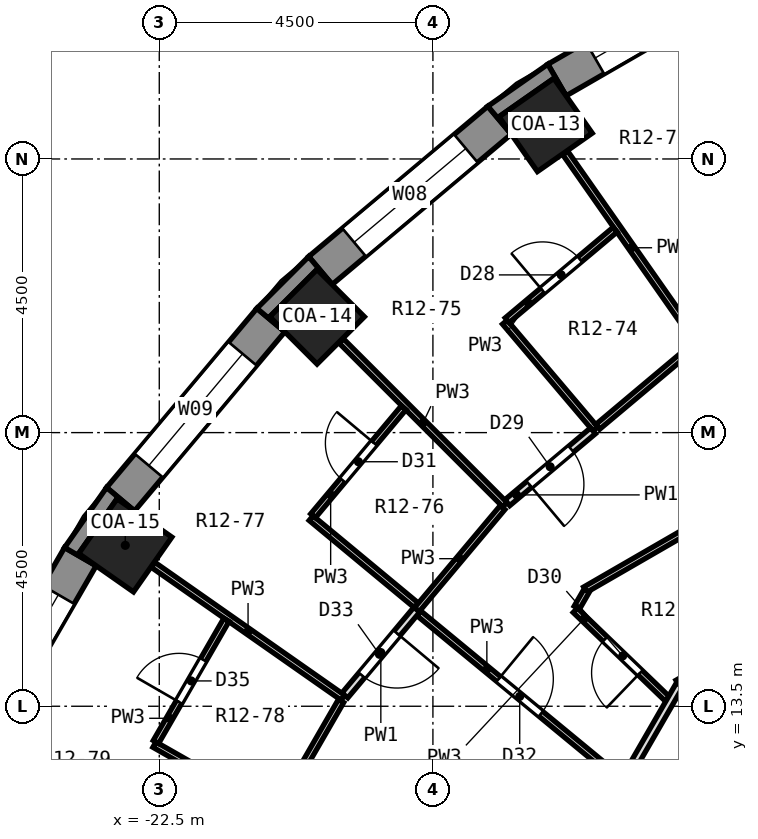
"""IFC4 building model, lengths in metres.
Left out: names, types, materials, properties, quantities, classifications, styles, units other than length and angle.
Written with IfcOpenShell. Run it as: python <this file> out.ifc"""

import sys

from ifc_helpers import new_model, si_unit, direction, frame, frame_2d, origin, origin_2d, place, context, subcontext, project, spatial, polyline, rectangle, outline, extrude, element, fill, save


model = new_model("IFC4")
c1 = context("Model", 3, precision=1e-05, world=origin(), true_north=direction((0.0, 1.0)))
c2 = subcontext(c1, "Body", "Model", "MODEL_VIEW")
j1 = project(units=[si_unit("LENGTHUNIT", "METRE"), si_unit("PLANEANGLEUNIT", "RADIAN")], contexts=[c1])
p1 = place(None, origin())
s1 = spatial("IfcSite", under=j1, at=p1, CompositionType="ELEMENT")
p2 = place(p1, origin())
s2 = spatial("IfcBuilding", under=s1, at=p2, CompositionType="ELEMENT")
p3 = place(p2, frame((0.0, 0.0, 56.0)))
s3 = spatial("IfcBuildingStorey", under=s2, at=p3, CompositionType="ELEMENT", Elevation=56.0)
for number, where, z_axis, x_axis in (
    (1, (-16.146, 23.059, 0.0), (0.0, 0.0, 1.0), (-0.574, 0.819, 0.0)),
    (2, (-19.905, 19.905, 0.0), (0.0, 0.0, 1.0), (-0.707, 0.707, 0.0)),
    (3, (-23.059, 16.146, 0.0), (0.0, 0.0, 1.0), (-0.819, 0.574, 0.0)),
):
    element("IfcColumn", number, at=place(p3, frame(where, z_axis=z_axis, x_axis=x_axis)), inside=s3, PredefinedType="COLUMN", context=c2, shape_type="SweptSolid", body=[
        extrude(rectangle(XDim=1.1, YDim=1.1, at=origin_2d()), origin(), (0.0, 0.0, 1.0), 3.3),
    ])
p4 = place(p3, frame((-12.63, 25.721, 0.0), z_axis=(0.0, 0.0, 1.0), x_axis=(-0.86603124159, -0.499989888488, 0.0)))
e4 = element("IfcWall", 4, at=p4, inside=s3, PredefinedType="SOLIDWALL", context=c2, shape_type="SweptSolid", body=[
    extrude(rectangle(XDim=3.846, YDim=0.6, at=frame_2d((1.923, 0.0))), origin(), (0.0, 0.0, 1.0), 2.75),
])
p5 = place(p4, frame((0.723, 0.0, 0.9)))
e5 = element("IfcOpeningElement", 5, at=p5, cuts=e4, PredefinedType="OPENING", context=c2, shape_type="SweptSolid", body=[
    extrude(rectangle(XDim=2.4, YDim=1.8, at=frame_2d((1.2, 0.9))), frame((0.0, 0.312, 0.0), z_axis=(0.0, -1.0, 0.0), x_axis=(1.0, 0.0, 0.0)), (0.0, 0.0, 1.0), 0.624),
])
p6 = place(p3, frame((-16.904, 23.137, 0.0), z_axis=(0.0, 0.0, 1.0), x_axis=(-0.766026164483, -0.642809392687, 0.0)))
e6 = element("IfcWall", 6, at=p6, inside=s3, PredefinedType="SOLIDWALL", context=c2, shape_type="SweptSolid", body=[
    extrude(rectangle(XDim=3.846, YDim=0.6, at=frame_2d((1.923, 0.0))), origin(), (0.0, 0.0, 1.0), 2.75),
])
p7 = place(p6, frame((0.723, 0.0, 0.9)))
e7 = element("IfcOpeningElement", 7, at=p7, cuts=e6, PredefinedType="OPENING", context=c2, shape_type="SweptSolid", body=[
    extrude(rectangle(XDim=2.4, YDim=1.8, at=frame_2d((1.2, 0.9))), frame((0.0, 0.312, 0.0), z_axis=(0.0, -1.0, 0.0), x_axis=(1.0, 0.0, 0.0)), (0.0, 0.0, 1.0), 0.624),
])
p8 = place(p3, frame((-20.665, 19.85, 0.0), z_axis=(0.0, 0.0, 1.0), x_axis=(-0.642809392687, -0.766026164483, 0.0)))
e8 = element("IfcWall", 8, at=p8, inside=s3, PredefinedType="SOLIDWALL", context=c2, shape_type="SweptSolid", body=[
    extrude(rectangle(XDim=3.846, YDim=0.6, at=frame_2d((1.923, 0.0))), origin(), (0.0, 0.0, 1.0), 2.75),
])
p9 = place(p8, frame((0.723, 0.0, 0.9)))
e9 = element("IfcOpeningElement", 9, at=p9, cuts=e8, PredefinedType="OPENING", context=c2, shape_type="SweptSolid", body=[
    extrude(rectangle(XDim=2.4, YDim=1.8, at=frame_2d((1.2, 0.9))), frame((0.0, 0.312, 0.0), z_axis=(0.0, -1.0, 0.0), x_axis=(1.0, 0.0, 0.0)), (0.0, 0.0, 1.0), 0.624),
])
p10 = place(p3, frame((-23.798, 15.96, 0.0), z_axis=(0.0, 0.0, 1.0), x_axis=(-0.499989888488, -0.86603124159, 0.0)))
e10 = element("IfcWall", 10, at=p10, inside=s3, PredefinedType="SOLIDWALL", context=c2, shape_type="SweptSolid", body=[
    extrude(rectangle(XDim=3.846, YDim=0.6, at=frame_2d((1.923, 0.0))), origin(), (0.0, 0.0, 1.0), 2.75),
])
p11 = place(p10, frame((0.723, 0.0, 0.9)))
e11 = element("IfcOpeningElement", 11, at=p11, cuts=e10, PredefinedType="OPENING", context=c2, shape_type="SweptSolid", body=[
    extrude(rectangle(XDim=2.4, YDim=1.8, at=frame_2d((1.2, 0.9))), frame((0.0, 0.312, 0.0), z_axis=(0.0, -1.0, 0.0), x_axis=(1.0, 0.0, 0.0)), (0.0, 0.0, 1.0), 0.624),
])
p12 = place(p3, origin())
e12 = element("IfcWall", 12, at=p12, inside=s3, PredefinedType="SOLIDWALL", context=c2, shape_type="SweptSolid", body=[
    extrude(outline(polyline([(-16.11, 24.058), (-17.097, 23.367), (-16.711, 22.907), (-16.912, 23.194), (-16.011, 23.825), (-15.81, 23.538), (-16.11, 24.058)])), origin(), (0.0, 0.0, 1.0), 2.75),
])
p13 = place(p3, origin())
e13 = element("IfcWall", 13, at=p13, inside=s3, PredefinedType="SOLIDWALL", context=c2, shape_type="SweptSolid", body=[
    extrude(outline(polyline([(-20.895, 20.043), (-20.435, 19.657), (-20.683, 19.905), (-19.905, 20.683), (-19.657, 20.435), (-20.043, 20.895), (-20.895, 20.043)])), origin(), (0.0, 0.0, 1.0), 2.75),
])
p14 = place(p3, origin())
e14 = element("IfcWall", 14, at=p14, inside=s3, PredefinedType="SOLIDWALL", context=c2, shape_type="SweptSolid", body=[
    extrude(outline(polyline([(-23.367, 17.097), (-24.058, 16.11), (-23.538, 15.81), (-23.825, 16.011), (-23.194, 16.912), (-22.907, 16.711), (-23.367, 17.097)])), origin(), (0.0, 0.0, 1.0), 2.75),
])
p15 = place(p3, frame((-15.825, 22.601, 0.0), z_axis=(0.0, 0.0, 1.0), x_axis=(0.573574167811, -0.819153632733, 0.0)))
e15 = element("IfcWall", 15, at=p15, inside=s3, PredefinedType="PARTITIONING", context=c2, shape_type="SweptSolid", body=[
    extrude(rectangle(XDim=3.81, YDim=0.1, at=frame_2d((1.905, 0.0))), origin(), (0.0, 0.0, 1.0), 2.75),
])
p16 = place(p3, frame((-16.817, 19.816, 0.0), z_axis=(0.0, 0.0, 1.0), x_axis=(0.646883930741, -0.762588473653, 0.0)))
e16 = element("IfcWall", 16, at=p16, inside=s3, PredefinedType="PARTITIONING", context=c2, shape_type="SweptSolid", body=[
    extrude(rectangle(XDim=2.3, YDim=0.1, at=frame_2d((1.15, 0.0))), origin(), (0.0, 0.0, 1.0), 2.75),
])
p17 = place(p3, frame((-19.509, 19.509, 0.0), z_axis=(0.0, 0.0, 1.0), x_axis=(0.707106781187, -0.707106781187, 0.0)))
e17 = element("IfcWall", 17, at=p17, inside=s3, PredefinedType="PARTITIONING", context=c2, shape_type="SweptSolid", body=[
    extrude(rectangle(XDim=3.81, YDim=0.1, at=frame_2d((1.905, 0.0))), origin(), (0.0, 0.0, 1.0), 2.75),
])
p18 = place(p3, frame((-15.658, 15.078, 0.0), z_axis=(0.0, 0.0, 1.0), x_axis=(0.720406258369, -0.693552321676, 0.0)))
e18 = element("IfcWall", 18, at=p18, inside=s3, PredefinedType="PARTITIONING", context=c2, shape_type="SweptSolid", body=[
    extrude(rectangle(XDim=2.1, YDim=0.1, at=frame_2d((1.05, 0.0))), origin(), (0.0, 0.0, 1.0), 2.75),
])
p19 = place(p18, frame((0.681, 0.0, 0.0)))
e19 = element("IfcOpeningElement", 19, at=p19, cuts=e18, PredefinedType="OPENING", context=c2, shape_type="SweptSolid", body=[
    extrude(rectangle(XDim=0.8, YDim=2.1, at=frame_2d((0.4, 1.05))), frame((0.0, 0.062, 0.0), z_axis=(0.0, -1.0, 0.0), x_axis=(1.0, 0.0, 0.0)), (0.0, 0.0, 1.0), 0.124),
])
p20 = place(p3, frame((-20.003, 16.594, 0.0), z_axis=(0.0, 0.0, 1.0), x_axis=(0.769713734446, -0.638389197125, 0.0)))
e20 = element("IfcWall", 20, at=p20, inside=s3, PredefinedType="PARTITIONING", context=c2, shape_type="SweptSolid", body=[
    extrude(rectangle(XDim=2.25, YDim=0.1, at=frame_2d((1.125, 0.0))), origin(), (0.0, 0.0, 1.0), 2.75),
])
p21 = place(p3, frame((-18.232, 15.029, 0.0), z_axis=(0.0, 0.0, 1.0), x_axis=(0.771607312324, -0.636099171174, 0.0)))
e21 = element("IfcWall", 21, at=p21, inside=s3, PredefinedType="PARTITIONING", context=c2, shape_type="SweptSolid", body=[
    extrude(rectangle(XDim=4.301, YDim=0.1, at=frame_2d((2.15, 0.0))), origin(), (0.0, 0.0, 1.0), 2.75),
])
p22 = place(p21, frame((1.7, 0.0, 0.0)))
e22 = element("IfcOpeningElement", 22, at=p22, cuts=e21, PredefinedType="OPENING", context=c2, shape_type="SweptSolid", body=[
    extrude(rectangle(XDim=0.9, YDim=2.1, at=frame_2d((0.45, 1.05))), frame((0.0, 0.062, 0.0), z_axis=(0.0, -1.0, 0.0), x_axis=(1.0, 0.0, 0.0)), (0.0, 0.0, 1.0), 0.124),
])
p23 = place(p3, frame((-22.601, 15.825, 0.0), z_axis=(0.0, 0.0, 1.0), x_axis=(0.819153632733, -0.573574167811, 0.0)))
e23 = element("IfcWall", 23, at=p23, inside=s3, PredefinedType="PARTITIONING", context=c2, shape_type="SweptSolid", body=[
    extrude(rectangle(XDim=3.81, YDim=0.1, at=frame_2d((1.905, 0.0))), origin(), (0.0, 0.0, 1.0), 2.75),
])
p24 = place(p3, frame((-22.58, 12.869, 0.0), z_axis=(0.0, 0.0, 1.0), x_axis=(0.868771789729, -0.495212658735, 0.0)))
e24 = element("IfcWall", 24, at=p24, inside=s3, PredefinedType="PARTITIONING", context=c2, shape_type="SweptSolid", body=[
    extrude(rectangle(XDim=2.3, YDim=0.1, at=frame_2d((1.15, 0.0))), origin(), (0.0, 0.0, 1.0), 2.75),
])
p25 = place(p3, frame((-13.971, 13.873, 0.0), z_axis=(0.0, 0.0, 1.0), x_axis=(0.866024825845, 0.50000100102, 0.0)))
e25 = element("IfcWall", 25, at=p25, inside=s3, PredefinedType="PARTITIONING", context=c2, shape_type="SweptSolid", body=[
    extrude(rectangle(XDim=10.192, YDim=0.125, at=frame_2d((5.096, 0.0))), origin(), (0.0, 0.0, 1.0), 2.75),
])
p26 = place(p3, frame((-15.496, 15.417, 0.0), z_axis=(0.0, 0.0, 1.0), x_axis=(0.865919547832, 0.500183303083, 0.0)))
e26 = element("IfcWall", 26, at=p26, inside=s3, PredefinedType="PARTITIONING", context=c2, shape_type="SweptSolid", body=[
    extrude(rectangle(XDim=1.941, YDim=0.1, at=frame_2d((0.971, 0.0))), origin(), (0.0, 0.0, 1.0), 2.75),
])
p27 = place(p3, frame((-15.291, 18.094, 0.0), z_axis=(0.0, 0.0, 1.0), x_axis=(0.765911671875, 0.642945807114, 0.0)))
e27 = element("IfcWall", 27, at=p27, inside=s3, PredefinedType="PARTITIONING", context=c2, shape_type="SweptSolid", body=[
    extrude(rectangle(XDim=2.093, YDim=0.1, at=frame_2d((1.046, 0.0))), origin(), (0.0, 0.0, 1.0), 2.75),
])
p28 = place(p3, frame((-16.777, 16.847, 0.0), z_axis=(0.0, 0.0, 1.0), x_axis=(0.766052425686, 0.642778096314, 0.0)))
e28 = element("IfcWall", 28, at=p28, inside=s3, PredefinedType="PARTITIONING", context=c2, shape_type="SweptSolid", body=[
    extrude(rectangle(XDim=1.84, YDim=0.125, at=frame_2d((0.92, 0.0))), origin(), (0.0, 0.0, 1.0), 2.75),
])
p29 = place(p28, frame((0.47, 0.0, 0.0)))
e29 = element("IfcOpeningElement", 29, at=p29, cuts=e28, PredefinedType="OPENING", context=c2, shape_type="SweptSolid", body=[
    extrude(rectangle(XDim=0.9, YDim=2.1, at=frame_2d((0.45, 1.05))), frame((0.0, 0.074, 0.0), z_axis=(0.0, -1.0, 0.0), x_axis=(1.0, 0.0, 0.0)), (0.0, 0.0, 1.0), 0.149),
])
p30 = place(p3, frame((-16.779, 19.848, 0.0), z_axis=(0.0, 0.0, 1.0), x_axis=(0.766051078848, 0.642779701449, 0.0)))
e30 = element("IfcWall", 30, at=p30, inside=s3, PredefinedType="PARTITIONING", context=c2, shape_type="SweptSolid", body=[
    extrude(rectangle(XDim=2.319, YDim=0.1, at=frame_2d((1.16, 0.0))), origin(), (0.0, 0.0, 1.0), 2.75),
])
p31 = place(p30, frame((0.76, 0.0, 0.0)))
e31 = element("IfcOpeningElement", 31, at=p31, cuts=e30, PredefinedType="OPENING", context=c2, shape_type="SweptSolid", body=[
    extrude(rectangle(XDim=0.8, YDim=2.1, at=frame_2d((0.4, 1.05))), frame((0.0, 0.062, 0.0), z_axis=(0.0, -1.0, 0.0), x_axis=(1.0, 0.0, 0.0)), (0.0, 0.0, 1.0), 0.124),
])
p32 = place(p3, frame((-18.265, 15.087, 0.0), z_axis=(0.0, 0.0, 1.0), x_axis=(0.643038029584, 0.765834246106, 0.0)))
e32 = element("IfcWall", 32, at=p32, inside=s3, PredefinedType="PARTITIONING", context=c2, shape_type="SweptSolid", body=[
    extrude(rectangle(XDim=2.193, YDim=0.1, at=frame_2d((1.096, 0.0))), origin(), (0.0, 0.0, 1.0), 2.75),
])
p33 = place(p3, frame((-19.448, 13.678, 0.0), z_axis=(0.0, 0.0, 1.0), x_axis=(0.642778096314, 0.766052425686, 0.0)))
e33 = element("IfcWall", 33, at=p33, inside=s3, PredefinedType="PARTITIONING", context=c2, shape_type="SweptSolid", body=[
    extrude(rectangle(XDim=1.84, YDim=0.125, at=frame_2d((0.92, 0.0))), origin(), (0.0, 0.0, 1.0), 2.75),
])
p34 = place(p33, frame((0.433, 0.0, 0.0)))
e34 = element("IfcOpeningElement", 34, at=p34, cuts=e33, PredefinedType="OPENING", context=c2, shape_type="SweptSolid", body=[
    extrude(rectangle(XDim=0.9, YDim=2.1, at=frame_2d((0.45, 1.05))), frame((0.0, 0.074, 0.0), z_axis=(0.0, -1.0, 0.0), x_axis=(1.0, 0.0, 0.0)), (0.0, 0.0, 1.0), 0.149),
])
p35 = place(p3, frame((-19.971, 16.632, 0.0), z_axis=(0.0, 0.0, 1.0), x_axis=(0.642624220064, 0.766181513603, 0.0)))
e35 = element("IfcWall", 35, at=p35, inside=s3, PredefinedType="PARTITIONING", context=c2, shape_type="SweptSolid", body=[
    extrude(rectangle(XDim=2.32, YDim=0.1, at=frame_2d((1.16, 0.0))), origin(), (0.0, 0.0, 1.0), 2.75),
])
p36 = place(p35, frame((0.76, 0.0, 0.0)))
e36 = element("IfcOpeningElement", 36, at=p36, cuts=e35, PredefinedType="OPENING", context=c2, shape_type="SweptSolid", body=[
    extrude(rectangle(XDim=0.8, YDim=2.1, at=frame_2d((0.4, 1.05))), frame((0.0, 0.062, 0.0), z_axis=(0.0, -1.0, 0.0), x_axis=(1.0, 0.0, 0.0)), (0.0, 0.0, 1.0), 0.124),
])
p37 = place(p3, frame((-15.926, 10.416, 0.0), z_axis=(0.0, 0.0, 1.0), x_axis=(0.500020477838, 0.866013580576, 0.0)))
e37 = element("IfcWall", 37, at=p37, inside=s3, PredefinedType="PARTITIONING", context=c2, shape_type="SweptSolid", body=[
    extrude(rectangle(XDim=3.971, YDim=0.125, at=frame_2d((1.985, 0.0))), origin(), (0.0, 0.0, 1.0), 2.75),
])
p38 = place(p37, frame((0.53, 0.0, 0.0)))
e38 = element("IfcOpeningElement", 38, at=p38, cuts=e37, PredefinedType="OPENING", context=c2, shape_type="SweptSolid", body=[
    extrude(rectangle(XDim=1.0, YDim=2.1, at=frame_2d((0.5, 1.05))), frame((0.0, 0.074, 0.0), z_axis=(0.0, -1.0, 0.0), x_axis=(1.0, 0.0, 0.0)), (0.0, 0.0, 1.0), 0.149),
])
p39 = place(p3, frame((-20.557, 11.773, 0.0), z_axis=(0.0, 0.0, 1.0), x_axis=(0.499752749986, 0.866168106594, 0.0)))
e39 = element("IfcWall", 39, at=p39, inside=s3, PredefinedType="PARTITIONING", context=c2, shape_type="SweptSolid", body=[
    extrude(rectangle(XDim=2.093, YDim=0.1, at=frame_2d((1.046, 0.0))), origin(), (0.0, 0.0, 1.0), 2.75),
])
p40 = place(p3, frame((-22.555, 12.912, 0.0), z_axis=(0.0, 0.0, 1.0), x_axis=(0.499819678633, 0.866129487347, 0.0)))
e40 = element("IfcWall", 40, at=p40, inside=s3, PredefinedType="PARTITIONING", context=c2, shape_type="SweptSolid", body=[
    extrude(rectangle(XDim=2.319, YDim=0.1, at=frame_2d((1.159, 0.0))), origin(), (0.0, 0.0, 1.0), 2.75),
])
p41 = place(p40, frame((0.76, 0.0, 0.0)))
e41 = element("IfcOpeningElement", 41, at=p41, cuts=e40, PredefinedType="OPENING", context=c2, shape_type="SweptSolid", body=[
    extrude(rectangle(XDim=0.8, YDim=2.1, at=frame_2d((0.4, 1.05))), frame((0.0, 0.062, 0.0), z_axis=(0.0, -1.0, 0.0), x_axis=(1.0, 0.0, 0.0)), (0.0, 0.0, 1.0), 0.124),
])
p42 = place(p3, frame((-15.633, 15.121, 0.0), z_axis=(0.0, 0.0, 1.0), x_axis=(0.499375175205, 0.866385846139, 0.0)))
e42 = element("IfcWall", 42, at=p42, inside=s3, PredefinedType="PARTITIONING", context=c2, shape_type="SweptSolid", body=[
    extrude(rectangle(XDim=0.325, YDim=0.1, at=frame_2d((0.162, 0.0))), origin(), (0.0, 0.0, 1.0), 2.75),
])
p43 = place(p5, origin())
e43 = element("IfcWindow", 43, at=p43, inside=s3, PartitioningType="SINGLE_PANEL", PredefinedType="WINDOW", context=c2, shape_type="SweptSolid", body=[
    extrude(rectangle(XDim=2.4, YDim=1.8, at=frame_2d((1.2, 0.9))), frame((0.0, 0.18, 0.0), z_axis=(0.0, -1.0, 0.0), x_axis=(1.0, 0.0, 0.0)), (0.0, 0.0, 1.0), 0.06),
])
fill(e5, e43)
p44 = place(p7, origin())
e44 = element("IfcWindow", 44, at=p44, inside=s3, PartitioningType="SINGLE_PANEL", PredefinedType="WINDOW", context=c2, shape_type="SweptSolid", body=[
    extrude(rectangle(XDim=2.4, YDim=1.8, at=frame_2d((1.2, 0.9))), frame((0.0, 0.18, 0.0), z_axis=(0.0, -1.0, 0.0), x_axis=(1.0, 0.0, 0.0)), (0.0, 0.0, 1.0), 0.06),
])
fill(e7, e44)
p45 = place(p9, origin())
e45 = element("IfcWindow", 45, at=p45, inside=s3, PartitioningType="SINGLE_PANEL", PredefinedType="WINDOW", context=c2, shape_type="SweptSolid", body=[
    extrude(rectangle(XDim=2.4, YDim=1.8, at=frame_2d((1.2, 0.9))), frame((0.0, 0.18, 0.0), z_axis=(0.0, -1.0, 0.0), x_axis=(1.0, 0.0, 0.0)), (0.0, 0.0, 1.0), 0.06),
])
fill(e9, e45)
p46 = place(p11, origin())
e46 = element("IfcWindow", 46, at=p46, inside=s3, PartitioningType="SINGLE_PANEL", PredefinedType="WINDOW", context=c2, shape_type="SweptSolid", body=[
    extrude(rectangle(XDim=2.4, YDim=1.8, at=frame_2d((1.2, 0.9))), frame((0.0, 0.18, 0.0), z_axis=(0.0, -1.0, 0.0), x_axis=(1.0, 0.0, 0.0)), (0.0, 0.0, 1.0), 0.06),
])
fill(e11, e46)
p47 = place(p31, origin())
e47 = element("IfcDoor", 47, at=p47, inside=s3, OperationType="SINGLE_SWING_LEFT", PredefinedType="DOOR", context=c2, shape_type="SweptSolid", body=[
    extrude(rectangle(XDim=0.8, YDim=2.1, at=frame_2d((0.4, 1.05))), frame((0.0, 0.025, 0.0), z_axis=(0.0, -1.0, 0.0), x_axis=(1.0, 0.0, 0.0)), (0.0, 0.0, 1.0), 0.05),
])
fill(e31, e47)
p48 = place(p29, frame((0.9, 0.0, 0.0), z_axis=(0.0, 0.0, 1.0), x_axis=(-1.0, 0.0, 0.0)))
e48 = element("IfcDoor", 48, at=p48, inside=s3, OperationType="SINGLE_SWING_RIGHT", PredefinedType="DOOR", context=c2, shape_type="SweptSolid", body=[
    extrude(rectangle(XDim=0.9, YDim=2.1, at=frame_2d((0.45, 1.05))), frame((0.0, 0.025, 0.0), z_axis=(0.0, -1.0, 0.0), x_axis=(1.0, 0.0, 0.0)), (0.0, 0.0, 1.0), 0.05),
])
fill(e29, e48)
p49 = place(p19, frame((0.8, 0.0, 0.0), z_axis=(0.0, 0.0, 1.0), x_axis=(-1.0, 0.0, 0.0)))
e49 = element("IfcDoor", 49, at=p49, inside=s3, OperationType="SINGLE_SWING_LEFT", PredefinedType="DOOR", context=c2, shape_type="SweptSolid", body=[
    extrude(rectangle(XDim=0.8, YDim=2.1, at=frame_2d((0.4, 1.05))), frame((0.0, 0.025, 0.0), z_axis=(0.0, -1.0, 0.0), x_axis=(1.0, 0.0, 0.0)), (0.0, 0.0, 1.0), 0.05),
])
fill(e19, e49)
p50 = place(p36, origin())
e50 = element("IfcDoor", 50, at=p50, inside=s3, OperationType="SINGLE_SWING_RIGHT", PredefinedType="DOOR", context=c2, shape_type="SweptSolid", body=[
    extrude(rectangle(XDim=0.8, YDim=2.1, at=frame_2d((0.4, 1.05))), frame((0.0, 0.025, 0.0), z_axis=(0.0, -1.0, 0.0), x_axis=(1.0, 0.0, 0.0)), (0.0, 0.0, 1.0), 0.05),
])
fill(e36, e50)
p51 = place(p22, origin())
e51 = element("IfcDoor", 51, at=p51, inside=s3, OperationType="SINGLE_SWING_LEFT", PredefinedType="DOOR", context=c2, shape_type="SweptSolid", body=[
    extrude(rectangle(XDim=0.9, YDim=2.1, at=frame_2d((0.45, 1.05))), frame((0.0, 0.025, 0.0), z_axis=(0.0, -1.0, 0.0), x_axis=(1.0, 0.0, 0.0)), (0.0, 0.0, 1.0), 0.05),
])
fill(e22, e51)
p52 = place(p34, frame((0.9, 0.0, 0.0), z_axis=(0.0, 0.0, 1.0), x_axis=(-1.0, 0.0, 0.0)))
e52 = element("IfcDoor", 52, at=p52, inside=s3, OperationType="SINGLE_SWING_LEFT", PredefinedType="DOOR", context=c2, shape_type="SweptSolid", body=[
    extrude(rectangle(XDim=0.9, YDim=2.1, at=frame_2d((0.45, 1.05))), frame((0.0, 0.025, 0.0), z_axis=(0.0, -1.0, 0.0), x_axis=(1.0, 0.0, 0.0)), (0.0, 0.0, 1.0), 0.05),
])
fill(e34, e52)
p53 = place(p41, origin())
e53 = element("IfcDoor", 53, at=p53, inside=s3, OperationType="SINGLE_SWING_LEFT", PredefinedType="DOOR", context=c2, shape_type="SweptSolid", body=[
    extrude(rectangle(XDim=0.8, YDim=2.1, at=frame_2d((0.4, 1.05))), frame((0.0, 0.025, 0.0), z_axis=(0.0, -1.0, 0.0), x_axis=(1.0, 0.0, 0.0)), (0.0, 0.0, 1.0), 0.05),
])
fill(e41, e53)
save(model, sys.argv[1])
